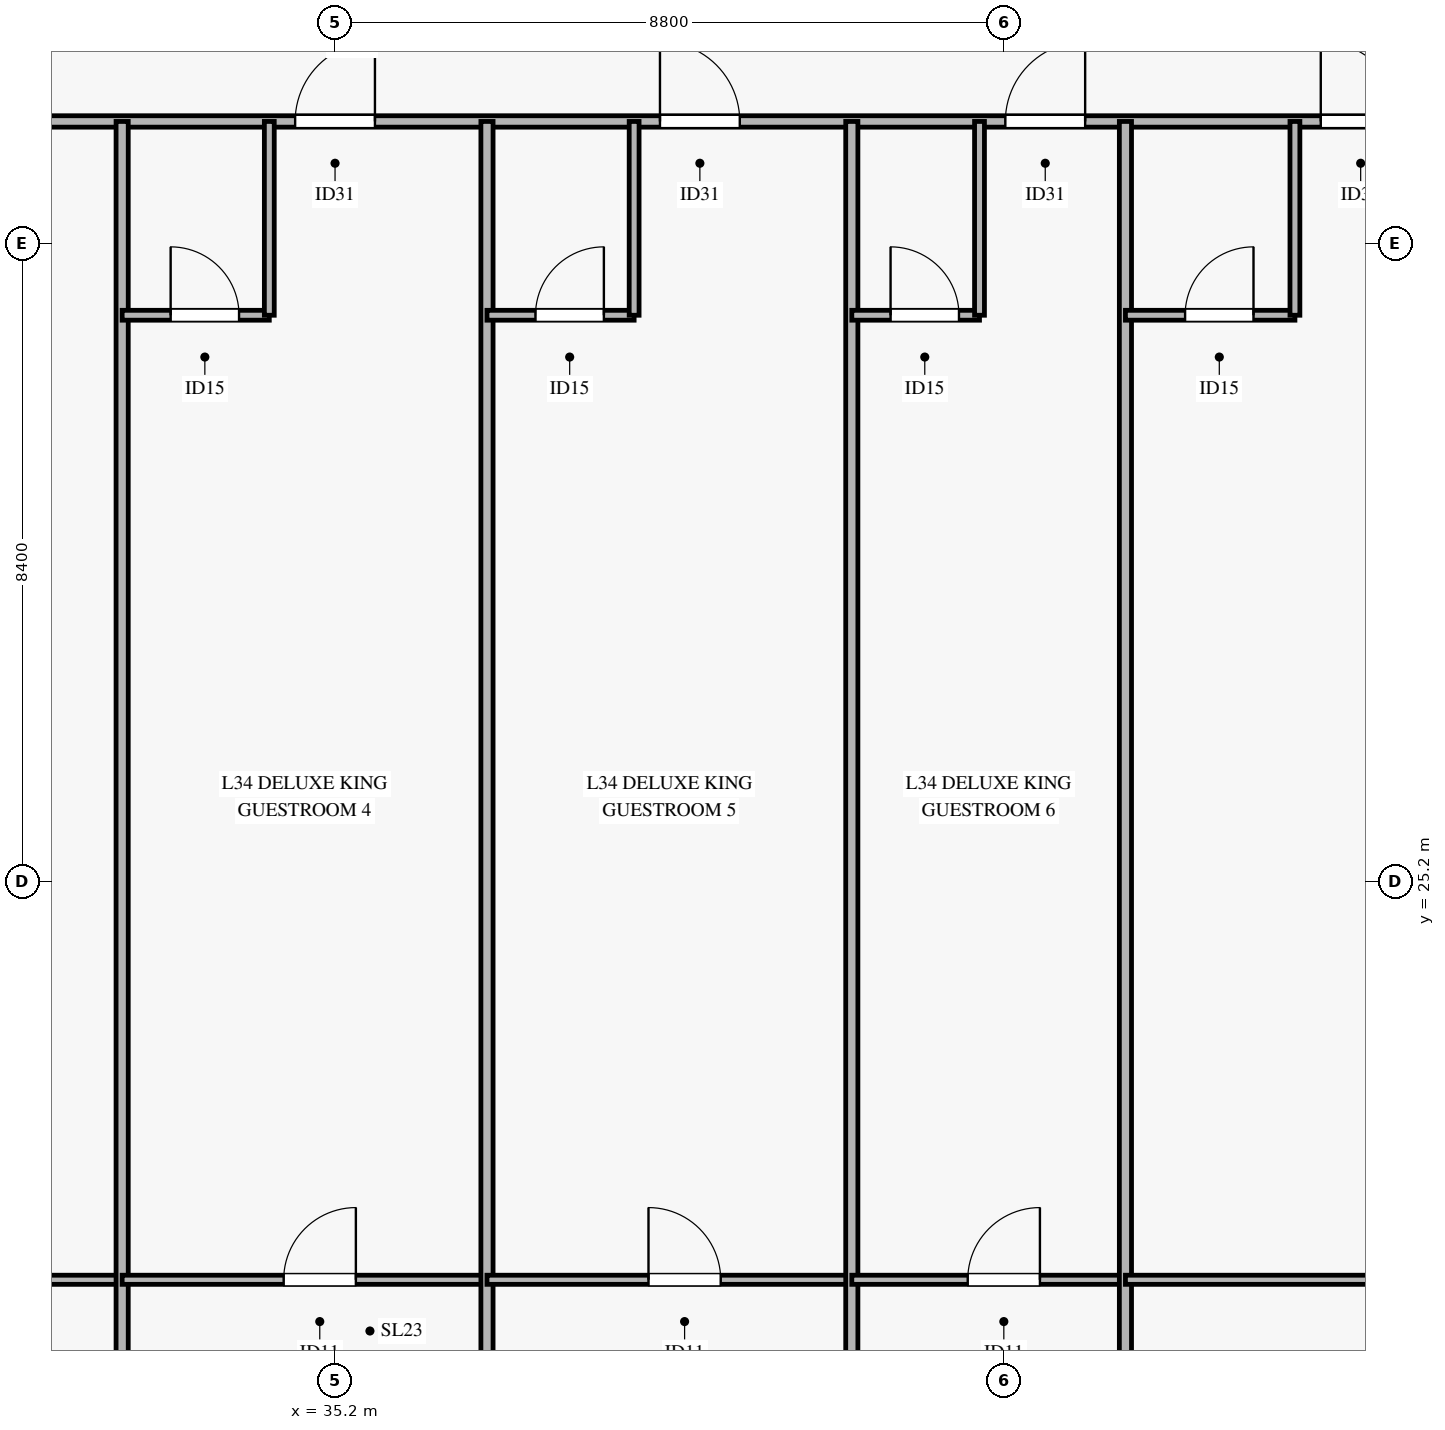
"""IFC4 building model, lengths in metres.
Left out: names, types, materials, properties, quantities, classifications, styles, units other than length and angle.
Written with IfcOpenShell. Run it as: python <this file> out.ifc"""

import sys

from ifc_helpers import new_model, si_unit, direction, frame, frame_2d, origin, place, context, subcontext, project, spatial, rectangle, extrude, source, transform, mapped, element, fill, save


model = new_model("IFC4")
c1 = context("Model", 3, precision=1e-05, world=origin(), true_north=direction((0.0, 1.0)))
c2 = subcontext(c1, "Body", "Model", "MODEL_VIEW")
j1 = project(units=[si_unit("LENGTHUNIT", "METRE"), si_unit("PLANEANGLEUNIT", "RADIAN")], contexts=[c1])
p1 = place(None, origin())
s1 = spatial("IfcSite", under=j1, at=p1, CompositionType="ELEMENT")
p2 = place(p1, origin())
s2 = spatial("IfcBuilding", under=s1, at=p2, CompositionType="ELEMENT")
p3 = place(p2, frame((0.0, 0.0, 141.2)))
s3 = spatial("IfcBuildingStorey", under=s2, at=p3, CompositionType="ELEMENT", Elevation=141.2)
p4 = place(p3, frame((5.214, 35.2, 0.0), z_axis=(0.0, 0.0, 1.0), x_axis=(1.0, 0.0, 0.0)))
e1 = element("IfcWall", 1, at=p4, inside=s3, PredefinedType="PARTITIONING", context=c2, shape_type="SweptSolid", body=[
    extrude(rectangle(XDim=59.972, YDim=0.15, at=frame_2d((29.986, 0.0))), origin(), (0.0, 0.0, 1.0), 2.405),
])
p5 = place(p4, frame((2.77, 0.0, 0.0)))
e2 = element("IfcOpeningElement", 2, at=p5, cuts=e1, PredefinedType="OPENING", context=c2, shape_type="SweptSolid", body=[
    extrude(rectangle(XDim=1.05, YDim=2.15, at=frame_2d((0.525, 1.075))), frame((0.0, 0.085, 0.0), z_axis=(0.0, -1.0, 0.0), x_axis=(1.0, 0.0, 0.0)), (0.0, 0.0, 1.0), 0.17),
])
p6 = place(p4, frame((19.156, 0.0, 0.0)))
e3 = element("IfcOpeningElement", 3, at=p6, cuts=e1, PredefinedType="OPENING", context=c2, shape_type="SweptSolid", body=[
    extrude(rectangle(XDim=1.05, YDim=2.15, at=frame_2d((0.525, 1.075))), frame((0.0, 0.085, 0.0), z_axis=(0.0, -1.0, 0.0), x_axis=(1.0, 0.0, 0.0)), (0.0, 0.0, 1.0), 0.17),
])
p7 = place(p4, frame((24.662, 0.0, 0.0)))
e4 = element("IfcOpeningElement", 4, at=p7, cuts=e1, PredefinedType="OPENING", context=c2, shape_type="SweptSolid", body=[
    extrude(rectangle(XDim=1.05, YDim=2.15, at=frame_2d((0.525, 1.075))), frame((0.0, 0.085, 0.0), z_axis=(0.0, -1.0, 0.0), x_axis=(1.0, 0.0, 0.0)), (0.0, 0.0, 1.0), 0.17),
])
p8 = place(p4, frame((29.462, 0.0, 0.0)))
e5 = element("IfcOpeningElement", 5, at=p8, cuts=e1, PredefinedType="OPENING", context=c2, shape_type="SweptSolid", body=[
    extrude(rectangle(XDim=1.05, YDim=2.15, at=frame_2d((0.525, 1.075))), frame((0.0, 0.085, 0.0), z_axis=(0.0, -1.0, 0.0), x_axis=(1.0, 0.0, 0.0)), (0.0, 0.0, 1.0), 0.17),
])
p9 = place(p4, frame((34.262, 0.0, 0.0)))
e6 = element("IfcOpeningElement", 6, at=p9, cuts=e1, PredefinedType="OPENING", context=c2, shape_type="SweptSolid", body=[
    extrude(rectangle(XDim=1.05, YDim=2.15, at=frame_2d((0.525, 1.075))), frame((0.0, 0.085, 0.0), z_axis=(0.0, -1.0, 0.0), x_axis=(1.0, 0.0, 0.0)), (0.0, 0.0, 1.0), 0.17),
])
p10 = place(p4, frame((38.806, 0.0, 0.0)))
e7 = element("IfcOpeningElement", 7, at=p10, cuts=e1, PredefinedType="OPENING", context=c2, shape_type="SweptSolid", body=[
    extrude(rectangle(XDim=1.05, YDim=2.15, at=frame_2d((0.525, 1.075))), frame((0.0, 0.085, 0.0), z_axis=(0.0, -1.0, 0.0), x_axis=(1.0, 0.0, 0.0)), (0.0, 0.0, 1.0), 0.17),
])
p11 = place(p4, frame((42.956, 0.0, 0.0)))
e8 = element("IfcOpeningElement", 8, at=p11, cuts=e1, PredefinedType="OPENING", context=c2, shape_type="SweptSolid", body=[
    extrude(rectangle(XDim=1.05, YDim=2.15, at=frame_2d((0.525, 1.075))), frame((0.0, 0.085, 0.0), z_axis=(0.0, -1.0, 0.0), x_axis=(1.0, 0.0, 0.0)), (0.0, 0.0, 1.0), 0.17),
])
p12 = place(p3, frame((27.6, 19.959, 0.0), z_axis=(0.0, 0.0, 1.0), x_axis=(1.0, 0.0, 0.0)))
e9 = element("IfcWall", 9, at=p12, inside=s3, PredefinedType="PARTITIONING", context=c2, shape_type="SweptSolid", body=[
    extrude(rectangle(XDim=4.8, YDim=0.12, at=frame_2d((2.4, 0.0))), origin(), (0.0, 0.0, 1.0), 2.405),
])
p13 = place(p12, frame((2.125, 0.0, 0.0)))
e10 = element("IfcOpeningElement", 10, at=p13, cuts=e9, PredefinedType="OPENING", context=c2, shape_type="SweptSolid", body=[
    extrude(rectangle(XDim=0.95, YDim=2.1, at=frame_2d((0.475, 1.05))), frame((0.0, 0.07, 0.0), z_axis=(0.0, -1.0, 0.0), x_axis=(1.0, 0.0, 0.0)), (0.0, 0.0, 1.0), 0.14),
])
p14 = place(p3, frame((32.4, 8.045, 0.0), z_axis=(0.0, 0.0, 1.0), x_axis=(0.0, 1.0, 0.0)))
e11 = element("IfcWall", 11, at=p14, inside=s3, PredefinedType="PARTITIONING", context=c2, shape_type="SweptSolid", body=[
    extrude(rectangle(XDim=27.155, YDim=0.16, at=frame_2d((13.578, 0.0))), origin(), (0.0, 0.0, 1.0), 2.705),
])
p15 = place(p3, frame((32.4, 32.65, 0.0), z_axis=(0.0, 0.0, 1.0), x_axis=(1.0, 0.0, 0.0)))
e12 = element("IfcWall", 12, at=p15, inside=s3, PredefinedType="PARTITIONING", context=c2, shape_type="SweptSolid", body=[
    extrude(rectangle(XDim=1.936, YDim=0.13, at=frame_2d((0.968, 0.0))), origin(), (0.0, 0.0, 1.0), 2.755),
])
p16 = place(p15, frame((0.638, 0.0, 0.0)))
e13 = element("IfcOpeningElement", 13, at=p16, cuts=e12, PredefinedType="OPENING", context=c2, shape_type="SweptSolid", body=[
    extrude(rectangle(XDim=0.9, YDim=2.1, at=frame_2d((0.45, 1.05))), frame((0.0, 0.075, 0.0), z_axis=(0.0, -1.0, 0.0), x_axis=(1.0, 0.0, 0.0)), (0.0, 0.0, 1.0), 0.15),
])
p17 = place(p3, frame((34.336, 32.65, 0.0), z_axis=(0.0, 0.0, 1.0), x_axis=(0.0, 1.0, 0.0)))
e14 = element("IfcWall", 14, at=p17, inside=s3, PredefinedType="PARTITIONING", context=c2, shape_type="SweptSolid", body=[
    extrude(rectangle(XDim=2.55, YDim=0.13, at=frame_2d((1.275, 0.0))), origin(), (0.0, 0.0, 1.0), 3.22),
])
p18 = place(p3, frame((32.4, 19.959, 0.0), z_axis=(0.0, 0.0, 1.0), x_axis=(1.0, 0.0, 0.0)))
e15 = element("IfcWall", 15, at=p18, inside=s3, PredefinedType="PARTITIONING", context=c2, shape_type="SweptSolid", body=[
    extrude(rectangle(XDim=4.8, YDim=0.12, at=frame_2d((2.4, 0.0))), origin(), (0.0, 0.0, 1.0), 3.22),
])
p19 = place(p18, frame((2.125, 0.0, 0.0)))
e16 = element("IfcOpeningElement", 16, at=p19, cuts=e15, PredefinedType="OPENING", context=c2, shape_type="SweptSolid", body=[
    extrude(rectangle(XDim=0.95, YDim=2.1, at=frame_2d((0.475, 1.05))), frame((0.0, 0.07, 0.0), z_axis=(0.0, -1.0, 0.0), x_axis=(1.0, 0.0, 0.0)), (0.0, 0.0, 1.0), 0.14),
])
p20 = place(p3, frame((37.2, 8.045, 0.0), z_axis=(0.0, 0.0, 1.0), x_axis=(0.0, 1.0, 0.0)))
e17 = element("IfcWall", 17, at=p20, inside=s3, PredefinedType="PARTITIONING", context=c2, shape_type="SweptSolid", body=[
    extrude(rectangle(XDim=27.155, YDim=0.16, at=frame_2d((13.578, 0.0))), origin(), (0.0, 0.0, 1.0), 2.755),
])
p21 = place(p3, frame((37.2, 32.65, 0.0), z_axis=(0.0, 0.0, 1.0), x_axis=(1.0, 0.0, 0.0)))
e18 = element("IfcWall", 18, at=p21, inside=s3, PredefinedType="PARTITIONING", context=c2, shape_type="SweptSolid", body=[
    extrude(rectangle(XDim=1.936, YDim=0.13, at=frame_2d((0.968, 0.0))), origin(), (0.0, 0.0, 1.0), 2.405),
])
p22 = place(p21, frame((0.638, 0.0, 0.0)))
e19 = element("IfcOpeningElement", 19, at=p22, cuts=e18, PredefinedType="OPENING", context=c2, shape_type="SweptSolid", body=[
    extrude(rectangle(XDim=0.9, YDim=2.1, at=frame_2d((0.45, 1.05))), frame((0.0, 0.075, 0.0), z_axis=(0.0, -1.0, 0.0), x_axis=(1.0, 0.0, 0.0)), (0.0, 0.0, 1.0), 0.15),
])
p23 = place(p3, frame((39.136, 32.65, 0.0), z_axis=(0.0, 0.0, 1.0), x_axis=(0.0, 1.0, 0.0)))
e20 = element("IfcWall", 20, at=p23, inside=s3, PredefinedType="PARTITIONING", context=c2, shape_type="SweptSolid", body=[
    extrude(rectangle(XDim=2.55, YDim=0.13, at=frame_2d((1.275, 0.0))), origin(), (0.0, 0.0, 1.0), 3.22),
])
p24 = place(p3, frame((37.2, 19.959, 0.0), z_axis=(0.0, 0.0, 1.0), x_axis=(1.0, 0.0, 0.0)))
e21 = element("IfcWall", 21, at=p24, inside=s3, PredefinedType="PARTITIONING", context=c2, shape_type="SweptSolid", body=[
    extrude(rectangle(XDim=4.8, YDim=0.12, at=frame_2d((2.4, 0.0))), origin(), (0.0, 0.0, 1.0), 2.405),
])
p25 = place(p24, frame((2.125, 0.0, 0.0)))
e22 = element("IfcOpeningElement", 22, at=p25, cuts=e21, PredefinedType="OPENING", context=c2, shape_type="SweptSolid", body=[
    extrude(rectangle(XDim=0.95, YDim=2.1, at=frame_2d((0.475, 1.05))), frame((0.0, 0.07, 0.0), z_axis=(0.0, -1.0, 0.0), x_axis=(1.0, 0.0, 0.0)), (0.0, 0.0, 1.0), 0.14),
])
p26 = place(p3, frame((42.0, 8.045, 0.0), z_axis=(0.0, 0.0, 1.0), x_axis=(0.0, 1.0, 0.0)))
e23 = element("IfcWall", 23, at=p26, inside=s3, PredefinedType="PARTITIONING", context=c2, shape_type="SweptSolid", body=[
    extrude(rectangle(XDim=27.155, YDim=0.16, at=frame_2d((13.578, 0.0))), origin(), (0.0, 0.0, 1.0), 2.705),
])
p27 = place(p3, frame((42.0, 32.65, 0.0), z_axis=(0.0, 0.0, 1.0), x_axis=(1.0, 0.0, 0.0)))
e24 = element("IfcWall", 24, at=p27, inside=s3, PredefinedType="PARTITIONING", context=c2, shape_type="SweptSolid", body=[
    extrude(rectangle(XDim=1.68, YDim=0.13, at=frame_2d((0.84, 0.0))), origin(), (0.0, 0.0, 1.0), 2.755),
])
p28 = place(p27, frame((0.51, 0.0, 0.0)))
e25 = element("IfcOpeningElement", 25, at=p28, cuts=e24, PredefinedType="OPENING", context=c2, shape_type="SweptSolid", body=[
    extrude(rectangle(XDim=0.9, YDim=2.1, at=frame_2d((0.45, 1.05))), frame((0.0, 0.075, 0.0), z_axis=(0.0, -1.0, 0.0), x_axis=(1.0, 0.0, 0.0)), (0.0, 0.0, 1.0), 0.15),
])
p29 = place(p3, frame((43.68, 32.65, 0.0), z_axis=(0.0, 0.0, 1.0), x_axis=(0.0, 1.0, 0.0)))
e26 = element("IfcWall", 26, at=p29, inside=s3, PredefinedType="PARTITIONING", context=c2, shape_type="SweptSolid", body=[
    extrude(rectangle(XDim=2.55, YDim=0.13, at=frame_2d((1.275, 0.0))), origin(), (0.0, 0.0, 1.0), 3.22),
])
p30 = place(p3, frame((42.0, 19.959, 0.0), z_axis=(0.0, 0.0, 1.0), x_axis=(1.0, 0.0, 0.0)))
e27 = element("IfcWall", 27, at=p30, inside=s3, PredefinedType="PARTITIONING", context=c2, shape_type="SweptSolid", body=[
    extrude(rectangle(XDim=3.6, YDim=0.12, at=frame_2d((1.8, 0.0))), origin(), (0.0, 0.0, 1.0), 2.405),
])
p31 = place(p30, frame((1.525, 0.0, 0.0)))
e28 = element("IfcOpeningElement", 28, at=p31, cuts=e27, PredefinedType="OPENING", context=c2, shape_type="SweptSolid", body=[
    extrude(rectangle(XDim=0.95, YDim=2.1, at=frame_2d((0.475, 1.05))), frame((0.0, 0.07, 0.0), z_axis=(0.0, -1.0, 0.0), x_axis=(1.0, 0.0, 0.0)), (0.0, 0.0, 1.0), 0.14),
])
p32 = place(p3, frame((45.6, 8.045, 0.0), z_axis=(0.0, 0.0, 1.0), x_axis=(0.0, 1.0, 0.0)))
e29 = element("IfcWall", 29, at=p32, inside=s3, PredefinedType="PARTITIONING", context=c2, shape_type="SweptSolid", body=[
    extrude(rectangle(XDim=27.155, YDim=0.16, at=frame_2d((13.578, 0.0))), origin(), (0.0, 0.0, 1.0), 2.705),
])
p33 = place(p3, frame((45.6, 32.65, 0.0), z_axis=(0.0, 0.0, 1.0), x_axis=(1.0, 0.0, 0.0)))
e30 = element("IfcWall", 30, at=p33, inside=s3, PredefinedType="PARTITIONING", context=c2, shape_type="SweptSolid", body=[
    extrude(rectangle(XDim=2.23, YDim=0.13, at=frame_2d((1.115, 0.0))), origin(), (0.0, 0.0, 1.0), 2.755),
])
p34 = place(p33, frame((0.785, 0.0, 0.0)))
e31 = element("IfcOpeningElement", 31, at=p34, cuts=e30, PredefinedType="OPENING", context=c2, shape_type="SweptSolid", body=[
    extrude(rectangle(XDim=0.9, YDim=2.1, at=frame_2d((0.45, 1.05))), frame((0.0, 0.075, 0.0), z_axis=(0.0, -1.0, 0.0), x_axis=(1.0, 0.0, 0.0)), (0.0, 0.0, 1.0), 0.15),
])
p35 = place(p3, frame((47.83, 32.65, 0.0), z_axis=(0.0, 0.0, 1.0), x_axis=(0.0, 1.0, 0.0)))
e32 = element("IfcWall", 32, at=p35, inside=s3, PredefinedType="PARTITIONING", context=c2, shape_type="SweptSolid", body=[
    extrude(rectangle(XDim=2.55, YDim=0.13, at=frame_2d((1.275, 0.0))), origin(), (0.0, 0.0, 1.0), 3.22),
])
p36 = place(p3, frame((45.6, 19.959, 0.0), z_axis=(0.0, 0.0, 1.0), x_axis=(1.0, 0.0, 0.0)))
e33 = element("IfcWall", 33, at=p36, inside=s3, PredefinedType="PARTITIONING", context=c2, shape_type="SweptSolid", body=[
    extrude(rectangle(XDim=19.586, YDim=0.12, at=frame_2d((9.793, 0.0))), origin(), (0.0, 0.0, 1.0), 2.405),
])
p37 = place(p36, frame((9.418, 0.0, 0.0)))
e34 = element("IfcOpeningElement", 34, at=p37, cuts=e33, PredefinedType="OPENING", context=c2, shape_type="SweptSolid", body=[
    extrude(rectangle(XDim=0.95, YDim=2.1, at=frame_2d((0.475, 1.05))), frame((0.0, 0.07, 0.0), z_axis=(0.0, -1.0, 0.0), x_axis=(1.0, 0.0, 0.0)), (0.0, 0.0, 1.0), 0.14),
])
m1 = source(origin(), c2, "Body", "SweptSolid", [
    extrude(rectangle(XDim=1.05, YDim=2.15, at=frame_2d((0.525, 1.075))), frame((0.0, 0.025, 0.0), z_axis=(0.0, -1.0, 0.0), x_axis=(1.0, 0.0, 0.0)), (0.0, 0.0, 1.0), 0.05),
])
p38 = place(p8, origin())
e35 = element("IfcDoor", 35, at=p38, inside=s3, OperationType="SINGLE_SWING_RIGHT", PredefinedType="DOOR", context=c2, shape_type="MappedRepresentation", body=[
    mapped(m1, transform((0.0, 0.0, 0.0), x_axis=(1.0, 0.0, 0.0), y_axis=(0.0, 1.0, 0.0), z_axis=(0.0, 0.0, 1.0), scale=1.0)),
])
fill(e5, e35)
m2 = source(origin(), c2, "Body", "SweptSolid", [
    extrude(rectangle(XDim=0.9, YDim=2.1, at=frame_2d((0.45, 1.05))), frame((0.0, 0.025, 0.0), z_axis=(0.0, -1.0, 0.0), x_axis=(1.0, 0.0, 0.0)), (0.0, 0.0, 1.0), 0.05),
])
p39 = place(p16, origin())
e36 = element("IfcDoor", 36, at=p39, inside=s3, OperationType="SINGLE_SWING_LEFT", PredefinedType="DOOR", context=c2, shape_type="MappedRepresentation", body=[
    mapped(m2, transform((0.0, 0.0, 0.0), x_axis=(1.0, 0.0, 0.0), y_axis=(0.0, 1.0, 0.0), z_axis=(0.0, 0.0, 1.0), scale=1.0)),
])
fill(e13, e36)
m3 = source(origin(), c2, "Body", "SweptSolid", [
    extrude(rectangle(XDim=0.95, YDim=2.1, at=frame_2d((0.475, 1.05))), frame((0.0, 0.025, 0.0), z_axis=(0.0, -1.0, 0.0), x_axis=(1.0, 0.0, 0.0)), (0.0, 0.0, 1.0), 0.05),
])
p40 = place(p19, origin())
e37 = element("IfcDoor", 37, at=p40, inside=s3, OperationType="SINGLE_SWING_RIGHT", PredefinedType="DOOR", context=c2, shape_type="MappedRepresentation", body=[
    mapped(m3, transform((0.0, 0.0, 0.0), x_axis=(1.0, 0.0, 0.0), y_axis=(0.0, 1.0, 0.0), z_axis=(0.0, 0.0, 1.0), scale=1.0)),
])
fill(e16, e37)
p41 = place(p9, origin())
e38 = element("IfcDoor", 38, at=p41, inside=s3, OperationType="SINGLE_SWING_LEFT", PredefinedType="DOOR", context=c2, shape_type="MappedRepresentation", body=[
    mapped(m1, transform((0.0, 0.0, 0.0), x_axis=(1.0, 0.0, 0.0), y_axis=(0.0, 1.0, 0.0), z_axis=(0.0, 0.0, 1.0), scale=1.0)),
])
fill(e6, e38)
p42 = place(p22, origin())
e39 = element("IfcDoor", 39, at=p42, inside=s3, OperationType="SINGLE_SWING_RIGHT", PredefinedType="DOOR", context=c2, shape_type="MappedRepresentation", body=[
    mapped(m2, transform((0.0, 0.0, 0.0), x_axis=(1.0, 0.0, 0.0), y_axis=(0.0, 1.0, 0.0), z_axis=(0.0, 0.0, 1.0), scale=1.0)),
])
fill(e19, e39)
p43 = place(p25, origin())
e40 = element("IfcDoor", 40, at=p43, inside=s3, OperationType="SINGLE_SWING_LEFT", PredefinedType="DOOR", context=c2, shape_type="MappedRepresentation", body=[
    mapped(m3, transform((0.0, 0.0, 0.0), x_axis=(1.0, 0.0, 0.0), y_axis=(0.0, 1.0, 0.0), z_axis=(0.0, 0.0, 1.0), scale=1.0)),
])
fill(e22, e40)
p44 = place(p10, origin())
e41 = element("IfcDoor", 41, at=p44, inside=s3, OperationType="SINGLE_SWING_RIGHT", PredefinedType="DOOR", context=c2, shape_type="MappedRepresentation", body=[
    mapped(m1, transform((0.0, 0.0, 0.0), x_axis=(1.0, 0.0, 0.0), y_axis=(0.0, 1.0, 0.0), z_axis=(0.0, 0.0, 1.0), scale=1.0)),
])
fill(e7, e41)
p45 = place(p28, origin())
e42 = element("IfcDoor", 42, at=p45, inside=s3, OperationType="SINGLE_SWING_LEFT", PredefinedType="DOOR", context=c2, shape_type="MappedRepresentation", body=[
    mapped(m2, transform((0.0, 0.0, 0.0), x_axis=(1.0, 0.0, 0.0), y_axis=(0.0, 1.0, 0.0), z_axis=(0.0, 0.0, 1.0), scale=1.0)),
])
fill(e25, e42)
p46 = place(p31, origin())
e43 = element("IfcDoor", 43, at=p46, inside=s3, OperationType="SINGLE_SWING_RIGHT", PredefinedType="DOOR", context=c2, shape_type="MappedRepresentation", body=[
    mapped(m3, transform((0.0, 0.0, 0.0), x_axis=(1.0, 0.0, 0.0), y_axis=(0.0, 1.0, 0.0), z_axis=(0.0, 0.0, 1.0), scale=1.0)),
])
fill(e28, e43)
p47 = place(p11, origin())
e44 = element("IfcDoor", 44, at=p47, inside=s3, OperationType="SINGLE_SWING_LEFT", PredefinedType="DOOR", context=c2, shape_type="MappedRepresentation", body=[
    mapped(m1, transform((0.0, 0.0, 0.0), x_axis=(1.0, 0.0, 0.0), y_axis=(0.0, 1.0, 0.0), z_axis=(0.0, 0.0, 1.0), scale=1.0)),
])
fill(e8, e44)
p48 = place(p34, origin())
e45 = element("IfcDoor", 45, at=p48, inside=s3, OperationType="SINGLE_SWING_RIGHT", PredefinedType="DOOR", context=c2, shape_type="MappedRepresentation", body=[
    mapped(m2, transform((0.0, 0.0, 0.0), x_axis=(1.0, 0.0, 0.0), y_axis=(0.0, 1.0, 0.0), z_axis=(0.0, 0.0, 1.0), scale=1.0)),
])
fill(e31, e45)
save(model, sys.argv[1])
